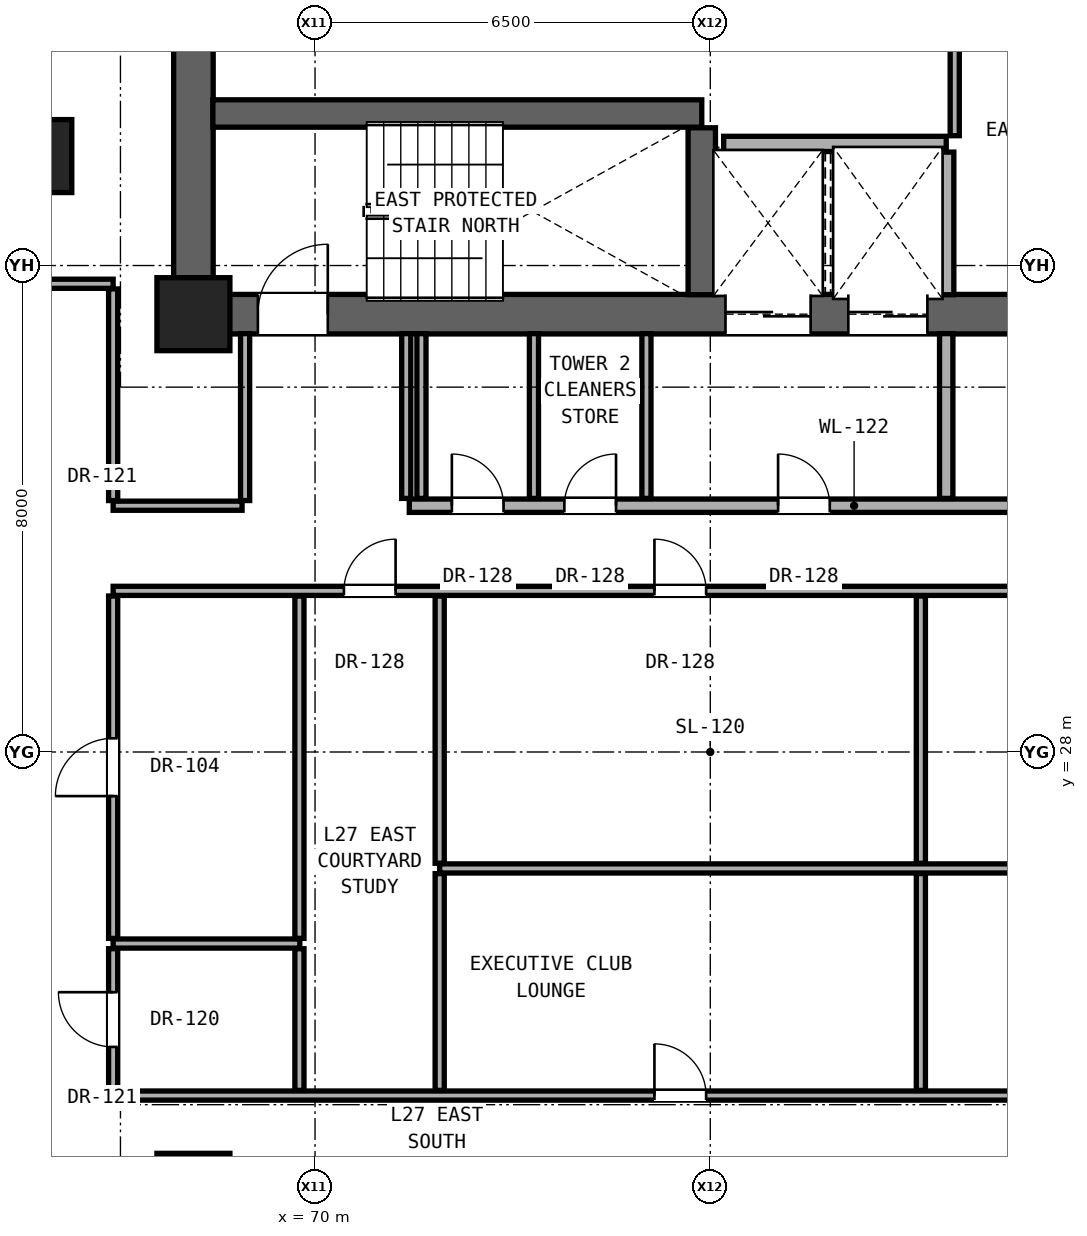
"""IFC4 building model, lengths in metres.
Left out: names, types, materials, properties, quantities, classifications, styles, units other than length and angle.
Written with IfcOpenShell. Run it as: python <this file> out.ifc"""

import sys

from ifc_helpers import new_model, si_unit, direction, frame, frame_2d, origin, origin_2d, place, context, subcontext, project, spatial, rectangle, extrude, element, fill, save


model = new_model("IFC4")
c1 = context("Model", 3, precision=1e-05, world=origin(), true_north=direction((0.0, 1.0)))
c2 = subcontext(c1, "Body", "Model", "MODEL_VIEW")
j1 = project(units=[si_unit("LENGTHUNIT", "METRE"), si_unit("PLANEANGLEUNIT", "RADIAN")], contexts=[c1])
p1 = place(None, origin())
s1 = spatial("IfcSite", under=j1, at=p1, CompositionType="ELEMENT")
p2 = place(p1, origin())
s2 = spatial("IfcBuilding", under=s1, at=p2, CompositionType="ELEMENT")
p3 = place(p2, frame((0.0, 0.0, 98.3)))
s3 = spatial("IfcBuildingStorey", under=s2, at=p3, CompositionType="ELEMENT", Elevation=98.3)
for number, where, z_axis, x_axis in (
    (1, (68.0, 20.8, 0.0), (0.0, 0.0, 1.0), (1.0, 0.0, 0.0)),
    (2, (68.0, 35.2, 0.0), (0.0, 0.0, 1.0), (1.0, 0.0, 0.0)),
):
    element("IfcColumn", number, at=place(p3, frame(where, z_axis=z_axis, x_axis=x_axis)), inside=s3, PredefinedType="COLUMN", context=c2, shape_type="SweptSolid", body=[
        extrude(rectangle(XDim=1.2, YDim=1.2, at=origin_2d()), origin(), (0.0, 0.0, 1.0), 3.3),
    ])
p4 = place(p3, frame((65.6, 37.8, 0.0), z_axis=(0.0, 0.0, 1.0), x_axis=(1.0, 0.0, 0.0)))
e3 = element("IfcColumn", 3, at=p4, inside=s3, PredefinedType="PILASTER", context=c2, shape_type="SweptSolid", body=[
    extrude(rectangle(XDim=0.8, YDim=1.2, at=origin_2d()), origin(), (0.0, 0.0, 1.0), 3.3),
])
p5 = place(p3, frame((68.0, 35.2, 0.0), z_axis=(0.0, 0.0, 1.0), x_axis=(0.0, 1.0, 0.0)))
e4 = element("IfcWall", 4, at=p5, inside=s3, PredefinedType="SHEAR", context=c2, shape_type="SweptSolid", body=[
    extrude(rectangle(XDim=5.6, YDim=0.65, at=frame_2d((2.8, 0.0))), origin(), (0.0, 0.0, 1.0), 3.08),
])
p6 = place(p3, frame((68.0, 35.2, 0.0), z_axis=(0.0, 0.0, 1.0), x_axis=(1.0, 0.0, 0.0)))
e5 = element("IfcWall", 5, at=p6, inside=s3, PredefinedType="SHEAR", context=c2, shape_type="SweptSolid", body=[
    extrude(rectangle(XDim=17.0, YDim=0.65, at=frame_2d((8.5, 0.0))), origin(), (0.0, 0.0, 1.0), 3.08),
])
p7 = place(p6, frame((1.06, 0.0, 0.0)))
e6 = element("IfcOpeningElement", 6, at=p7, cuts=e5, PredefinedType="OPENING", context=c2, shape_type="SweptSolid", body=[
    extrude(rectangle(XDim=1.15, YDim=2.2, at=frame_2d((0.575, 1.1))), frame((0.0, 0.335, 0.0), z_axis=(0.0, -1.0, 0.0), x_axis=(1.0, 0.0, 0.0)), (0.0, 0.0, 1.0), 0.67),
])
p8 = place(p6, frame((8.75, 0.0, 0.0)))
e7 = element("IfcOpeningElement", 7, at=p8, cuts=e5, PredefinedType="OPENING", context=c2, shape_type="SweptSolid", body=[
    extrude(rectangle(XDim=1.4, YDim=2.35, at=frame_2d((0.7, 1.175))), frame((0.0, 0.335, 0.0), z_axis=(0.0, -1.0, 0.0), x_axis=(1.0, 0.0, 0.0)), (0.0, 0.0, 1.0), 0.67),
])
p9 = place(p6, frame((10.77, 0.0, 0.0)))
e8 = element("IfcOpeningElement", 8, at=p9, cuts=e5, PredefinedType="OPENING", context=c2, shape_type="SweptSolid", body=[
    extrude(rectangle(XDim=1.3, YDim=2.3, at=frame_2d((0.65, 1.15))), frame((0.0, 0.335, 0.0), z_axis=(0.0, -1.0, 0.0), x_axis=(1.0, 0.0, 0.0)), (0.0, 0.0, 1.0), 0.67),
])
p10 = place(p3, frame((66.68, 22.35, 0.0), z_axis=(0.0, 0.0, 1.0), x_axis=(1.0, 0.0, 0.0)))
e9 = element("IfcWall", 9, at=p10, inside=s3, PredefinedType="PARTITIONING", context=c2, shape_type="SweptSolid", body=[
    extrude(rectangle(XDim=19.5, YDim=0.15, at=frame_2d((9.75, 0.0))), origin(), (0.0, 0.0, 1.0), 2.145),
])
p11 = place(p10, frame((8.902, 0.0, 0.0)))
e10 = element("IfcOpeningElement", 10, at=p11, cuts=e9, PredefinedType="OPENING", context=c2, shape_type="SweptSolid", body=[
    extrude(rectangle(XDim=0.85, YDim=2.01, at=frame_2d((0.425, 1.005))), frame((0.0, 0.085, 0.0), z_axis=(0.0, -1.0, 0.0), x_axis=(1.0, 0.0, 0.0)), (0.0, 0.0, 1.0), 0.17),
])
p12 = place(p10, frame((15.947, 0.0, 0.0)))
e11 = element("IfcOpeningElement", 11, at=p12, cuts=e9, PredefinedType="OPENING", context=c2, shape_type="SweptSolid", body=[
    extrude(rectangle(XDim=0.85, YDim=2.01, at=frame_2d((0.425, 1.005))), frame((0.0, 0.085, 0.0), z_axis=(0.0, -1.0, 0.0), x_axis=(1.0, 0.0, 0.0)), (0.0, 0.0, 1.0), 0.17),
])
p13 = place(p3, frame((66.68, 24.85, 0.0), z_axis=(0.0, 0.0, 1.0), x_axis=(1.0, 0.0, 0.0)))
e12 = element("IfcWall", 12, at=p13, inside=s3, PredefinedType="PARTITIONING", context=c2, shape_type="SweptSolid", body=[
    extrude(rectangle(XDim=3.07, YDim=0.15, at=frame_2d((1.535, 0.0))), origin(), (0.0, 0.0, 1.0), 2.145),
])
p14 = place(p3, frame((72.05, 26.085, 0.0), z_axis=(0.0, 0.0, 1.0), x_axis=(1.0, 0.0, 0.0)))
e13 = element("IfcWall", 13, at=p14, inside=s3, PredefinedType="PARTITIONING", context=c2, shape_type="SweptSolid", body=[
    extrude(rectangle(XDim=14.13, YDim=0.15, at=frame_2d((7.065, 0.0))), origin(), (0.0, 0.0, 1.0), 2.145),
])
p15 = place(p3, frame((66.68, 30.65, 0.0), z_axis=(0.0, 0.0, 1.0), x_axis=(1.0, 0.0, 0.0)))
e14 = element("IfcWall", 14, at=p15, inside=s3, PredefinedType="PARTITIONING", context=c2, shape_type="SweptSolid", body=[
    extrude(rectangle(XDim=19.5, YDim=0.15, at=frame_2d((9.75, 0.0))), origin(), (0.0, 0.0, 1.0), 2.145),
])
p16 = place(p15, frame((3.795, 0.0, 0.0)))
e15 = element("IfcOpeningElement", 15, at=p16, cuts=e14, PredefinedType="OPENING", context=c2, shape_type="SweptSolid", body=[
    extrude(rectangle(XDim=0.85, YDim=2.01, at=frame_2d((0.425, 1.005))), frame((0.0, 0.085, 0.0), z_axis=(0.0, -1.0, 0.0), x_axis=(1.0, 0.0, 0.0)), (0.0, 0.0, 1.0), 0.17),
])
p17 = place(p15, frame((8.902, 0.0, 0.0)))
e16 = element("IfcOpeningElement", 16, at=p17, cuts=e14, PredefinedType="OPENING", context=c2, shape_type="SweptSolid", body=[
    extrude(rectangle(XDim=0.85, YDim=2.01, at=frame_2d((0.425, 1.005))), frame((0.0, 0.085, 0.0), z_axis=(0.0, -1.0, 0.0), x_axis=(1.0, 0.0, 0.0)), (0.0, 0.0, 1.0), 0.17),
])
p18 = place(p15, frame((15.947, 0.0, 0.0)))
e17 = element("IfcOpeningElement", 17, at=p18, cuts=e14, PredefinedType="OPENING", context=c2, shape_type="SweptSolid", body=[
    extrude(rectangle(XDim=0.85, YDim=2.01, at=frame_2d((0.425, 1.005))), frame((0.0, 0.085, 0.0), z_axis=(0.0, -1.0, 0.0), x_axis=(1.0, 0.0, 0.0)), (0.0, 0.0, 1.0), 0.17),
])
p19 = place(p3, frame((66.68, 32.05, 0.0), z_axis=(0.0, 0.0, 1.0), x_axis=(1.0, 0.0, 0.0)))
e18 = element("IfcWall", 18, at=p19, inside=s3, PredefinedType="PARTITIONING", context=c2, shape_type="SweptSolid", body=[
    extrude(rectangle(XDim=2.12, YDim=0.15, at=frame_2d((1.06, 0.0))), origin(), (0.0, 0.0, 1.0), 2.145),
])
p20 = place(p3, frame((71.55, 32.05, 0.0), z_axis=(0.0, 0.0, 1.0), x_axis=(1.0, 0.0, 0.0)))
e19 = element("IfcWall", 19, at=p20, inside=s3, PredefinedType="SOLIDWALL", context=c2, shape_type="SweptSolid", body=[
    extrude(rectangle(XDim=14.63, YDim=0.22, at=frame_2d((7.315, 0.0))), origin(), (0.0, 0.0, 1.0), 2.145),
])
p21 = place(p20, frame((6.065, 0.0, 0.0)))
e20 = element("IfcOpeningElement", 20, at=p21, cuts=e19, PredefinedType="OPENING", context=c2, shape_type="SweptSolid", body=[
    extrude(rectangle(XDim=0.85, YDim=2.01, at=frame_2d((0.425, 1.005))), frame((0.0, 0.12, 0.0), z_axis=(0.0, -1.0, 0.0), x_axis=(1.0, 0.0, 0.0)), (0.0, 0.0, 1.0), 0.24),
])
p22 = place(p20, frame((10.585, 0.0, 0.0)))
e21 = element("IfcOpeningElement", 21, at=p22, cuts=e19, PredefinedType="OPENING", context=c2, shape_type="SweptSolid", body=[
    extrude(rectangle(XDim=0.85, YDim=2.01, at=frame_2d((0.425, 1.005))), frame((0.0, 0.12, 0.0), z_axis=(0.0, -1.0, 0.0), x_axis=(1.0, 0.0, 0.0)), (0.0, 0.0, 1.0), 0.24),
])
p23 = place(p20, frame((0.7, 0.0, 0.0)))
e22 = element("IfcOpeningElement", 22, at=p23, cuts=e19, PredefinedType="OPENING", context=c2, shape_type="SweptSolid", body=[
    extrude(rectangle(XDim=0.85, YDim=2.01, at=frame_2d((0.425, 1.005))), frame((0.0, 0.12, 0.0), z_axis=(0.0, -1.0, 0.0), x_axis=(1.0, 0.0, 0.0)), (0.0, 0.0, 1.0), 0.24),
])
p24 = place(p20, frame((2.55, 0.0, 0.0)))
e23 = element("IfcOpeningElement", 23, at=p24, cuts=e19, PredefinedType="OPENING", context=c2, shape_type="SweptSolid", body=[
    extrude(rectangle(XDim=0.85, YDim=2.01, at=frame_2d((0.425, 1.005))), frame((0.0, 0.12, 0.0), z_axis=(0.0, -1.0, 0.0), x_axis=(1.0, 0.0, 0.0)), (0.0, 0.0, 1.0), 0.24),
])
p25 = place(p3, frame((65.32, 35.7, 0.0), z_axis=(0.0, 0.0, 1.0), x_axis=(1.0, 0.0, 0.0)))
e24 = element("IfcWall", 24, at=p25, inside=s3, PredefinedType="PARTITIONING", context=c2, shape_type="SweptSolid", body=[
    extrude(rectangle(XDim=1.36, YDim=0.15, at=frame_2d((0.68, 0.0))), origin(), (0.0, 0.0, 1.0), 3.08),
])
p26 = place(p3, frame((76.72, 38.0, 0.0), z_axis=(0.0, 0.0, 1.0), x_axis=(1.0, 0.0, 0.0)))
e25 = element("IfcWall", 25, at=p26, inside=s3, PredefinedType="SOLIDWALL", context=c2, shape_type="SweptSolid", body=[
    extrude(rectangle(XDim=3.66, YDim=0.25, at=frame_2d((1.83, 0.0))), origin(), (0.0, 0.0, 1.0), 3.08),
])
p27 = place(p3, frame((68.32, 38.5, 0.0), z_axis=(0.0, 0.0, 1.0), x_axis=(1.0, 0.0, 0.0)))
e26 = element("IfcWall", 26, at=p27, inside=s3, PredefinedType="SHEAR", context=c2, shape_type="SweptSolid", body=[
    extrude(rectangle(XDim=8.04, YDim=0.45, at=frame_2d((4.02, 0.0))), origin(), (0.0, 0.0, 1.0), 3.08),
])
p28 = place(p3, frame((66.68, 22.435, 0.0), z_axis=(0.0, 0.0, 1.0), x_axis=(0.0, 1.0, 0.0)))
e27 = element("IfcWall", 27, at=p28, inside=s3, PredefinedType="PARTITIONING", context=c2, shape_type="SweptSolid", body=[
    extrude(rectangle(XDim=2.33, YDim=0.15, at=frame_2d((1.165, 0.0))), origin(), (0.0, 0.0, 1.0), 3.08),
])
p29 = place(p28, frame((0.715, 0.0, 0.0)))
e28 = element("IfcOpeningElement", 28, at=p29, cuts=e27, PredefinedType="OPENING", context=c2, shape_type="SweptSolid", body=[
    extrude(rectangle(XDim=0.9, YDim=2.1, at=frame_2d((0.45, 1.05))), frame((0.0, 0.085, 0.0), z_axis=(0.0, -1.0, 0.0), x_axis=(1.0, 0.0, 0.0)), (0.0, 0.0, 1.0), 0.17),
])
p30 = place(p3, frame((66.68, 24.935, 0.0), z_axis=(0.0, 0.0, 1.0), x_axis=(0.0, 1.0, 0.0)))
e29 = element("IfcWall", 29, at=p30, inside=s3, PredefinedType="PARTITIONING", context=c2, shape_type="SweptSolid", body=[
    extrude(rectangle(XDim=5.63, YDim=0.15, at=frame_2d((2.815, 0.0))), origin(), (0.0, 0.0, 1.0), 2.299),
])
p31 = place(p30, frame((2.34, 0.0, 0.0)))
e30 = element("IfcOpeningElement", 30, at=p31, cuts=e29, PredefinedType="OPENING", context=c2, shape_type="SweptSolid", body=[
    extrude(rectangle(XDim=0.95, YDim=2.15, at=frame_2d((0.475, 1.075))), frame((0.0, 0.085, 0.0), z_axis=(0.0, -1.0, 0.0), x_axis=(1.0, 0.0, 0.0)), (0.0, 0.0, 1.0), 0.17),
])
p32 = place(p3, frame((66.68, 32.135, 0.0), z_axis=(0.0, 0.0, 1.0), x_axis=(0.0, 1.0, 0.0)))
e31 = element("IfcWall", 31, at=p32, inside=s3, PredefinedType="PARTITIONING", context=c2, shape_type="SweptSolid", body=[
    extrude(rectangle(XDim=3.48, YDim=0.15, at=frame_2d((1.74, 0.0))), origin(), (0.0, 0.0, 1.0), 2.472),
])
p33 = place(p3, frame((68.85, 32.135, 0.0), z_axis=(0.0, 0.0, 1.0), x_axis=(0.0, 1.0, 0.0)))
e32 = element("IfcWall", 32, at=p33, inside=s3, PredefinedType="PARTITIONING", context=c2, shape_type="SweptSolid", body=[
    extrude(rectangle(XDim=2.745, YDim=0.15, at=frame_2d((1.373, 0.0))), origin(), (0.0, 0.0, 1.0), 3.08),
])
p34 = place(p3, frame((69.743, 22.435, 0.0), z_axis=(0.0, 0.0, 1.0), x_axis=(0.0, 1.0, 0.0)))
e33 = element("IfcWall", 33, at=p34, inside=s3, PredefinedType="PARTITIONING", context=c2, shape_type="SweptSolid", body=[
    extrude(rectangle(XDim=2.33, YDim=0.15, at=frame_2d((1.165, 0.0))), origin(), (0.0, 0.0, 1.0), 3.08),
])
p35 = place(p3, frame((69.743, 24.935, 0.0), z_axis=(0.0, 0.0, 1.0), x_axis=(0.0, 1.0, 0.0)))
e34 = element("IfcWall", 34, at=p35, inside=s3, PredefinedType="PARTITIONING", context=c2, shape_type="SweptSolid", body=[
    extrude(rectangle(XDim=5.63, YDim=0.15, at=frame_2d((2.815, 0.0))), origin(), (0.0, 0.0, 1.0), 2.145),
])
for number, where, z_axis, x_axis in (
    (35, (71.5, 32.17, 0.0), (0.0, 0.0, 1.0), (0.0, 1.0, 0.0)),
    (36, (71.75, 32.17, 0.0), (0.0, 0.0, 1.0), (0.0, 1.0, 0.0)),
):
    element("IfcWall", number, at=place(p3, frame(where, z_axis=z_axis, x_axis=x_axis)), inside=s3, PredefinedType="PARTITIONING", context=c2, shape_type="SweptSolid", body=[
        extrude(rectangle(XDim=2.71, YDim=0.15, at=frame_2d((1.355, 0.0))), origin(), (0.0, 0.0, 1.0), 3.08),
    ])
p36 = place(p3, frame((72.05, 22.435, 0.0), z_axis=(0.0, 0.0, 1.0), x_axis=(0.0, 1.0, 0.0)))
e37 = element("IfcWall", 37, at=p36, inside=s3, PredefinedType="PARTITIONING", context=c2, shape_type="SweptSolid", body=[
    extrude(rectangle(XDim=3.565, YDim=0.15, at=frame_2d((1.782, 0.0))), origin(), (0.0, 0.0, 1.0), 2.609),
])
p37 = place(p3, frame((72.05, 26.17, 0.0), z_axis=(0.0, 0.0, 1.0), x_axis=(0.0, 1.0, 0.0)))
e38 = element("IfcWall", 38, at=p37, inside=s3, PredefinedType="PARTITIONING", context=c2, shape_type="SweptSolid", body=[
    extrude(rectangle(XDim=4.395, YDim=0.15, at=frame_2d((2.198, 0.0))), origin(), (0.0, 0.0, 1.0), 2.145),
])
for number, where, z_axis, x_axis in (
    (39, (73.6, 32.17, 0.0), (0.0, 0.0, 1.0), (0.0, 1.0, 0.0)),
    (40, (75.45, 32.17, 0.0), (0.0, 0.0, 1.0), (0.0, 1.0, 0.0)),
):
    element("IfcWall", number, at=place(p3, frame(where, z_axis=z_axis, x_axis=x_axis)), inside=s3, PredefinedType="PARTITIONING", context=c2, shape_type="SweptSolid", body=[
        extrude(rectangle(XDim=2.71, YDim=0.15, at=frame_2d((1.355, 0.0))), origin(), (0.0, 0.0, 1.0), 3.08),
    ])
p38 = place(p3, frame((76.36, 35.52, 0.0), z_axis=(0.0, 0.0, 1.0), x_axis=(0.0, 1.0, 0.0)))
e41 = element("IfcWall", 41, at=p38, inside=s3, PredefinedType="SHEAR", context=c2, shape_type="SweptSolid", body=[
    extrude(rectangle(XDim=2.745, YDim=0.45, at=frame_2d((1.373, 0.0))), origin(), (0.0, 0.0, 1.0), 3.08),
])
p39 = place(p3, frame((79.963, 22.435, 0.0), z_axis=(0.0, 0.0, 1.0), x_axis=(0.0, 1.0, 0.0)))
e42 = element("IfcWall", 42, at=p39, inside=s3, PredefinedType="PARTITIONING", context=c2, shape_type="SweptSolid", body=[
    extrude(rectangle(XDim=3.565, YDim=0.15, at=frame_2d((1.782, 0.0))), origin(), (0.0, 0.0, 1.0), 3.08),
])
p40 = place(p3, frame((79.963, 26.17, 0.0), z_axis=(0.0, 0.0, 1.0), x_axis=(0.0, 1.0, 0.0)))
e43 = element("IfcWall", 43, at=p40, inside=s3, PredefinedType="PARTITIONING", context=c2, shape_type="SweptSolid", body=[
    extrude(rectangle(XDim=4.395, YDim=0.15, at=frame_2d((2.198, 0.0))), origin(), (0.0, 0.0, 1.0), 2.145),
])
p41 = place(p3, frame((80.38, 32.17, 0.0), z_axis=(0.0, 0.0, 1.0), x_axis=(0.0, 1.0, 0.0)))
e44 = element("IfcWall", 44, at=p41, inside=s3, PredefinedType="SOLIDWALL", context=c2, shape_type="SweptSolid", body=[
    extrude(rectangle(XDim=2.71, YDim=0.22, at=frame_2d((1.355, 0.0))), origin(), (0.0, 0.0, 1.0), 3.08),
])
p42 = place(p3, frame((80.38, 35.52, 0.0), z_axis=(0.0, 0.0, 1.0), x_axis=(0.0, 1.0, 0.0)))
e45 = element("IfcWall", 45, at=p42, inside=s3, PredefinedType="SOLIDWALL", context=c2, shape_type="SweptSolid", body=[
    extrude(rectangle(XDim=2.345, YDim=0.25, at=frame_2d((1.172, 0.0))), origin(), (0.0, 0.0, 1.0), 3.08),
])
p43 = place(p3, frame((80.52, 38.135, 0.0), z_axis=(0.0, 0.0, 1.0), x_axis=(0.0, 1.0, 0.0)))
e46 = element("IfcWall", 46, at=p43, inside=s3, PredefinedType="PARTITIONING", context=c2, shape_type="SweptSolid", body=[
    extrude(rectangle(XDim=2.315, YDim=0.15, at=frame_2d((1.157, 0.0))), origin(), (0.0, 0.0, 1.0), 3.08),
])
p44 = place(p7, origin())
e47 = element("IfcDoor", 47, at=p44, inside=s3, OperationType="SINGLE_SWING_RIGHT", PredefinedType="DOOR", context=c2, shape_type="SweptSolid", body=[
    extrude(rectangle(XDim=1.15, YDim=2.2, at=frame_2d((0.575, 1.1))), frame((0.0, 0.025, 0.0), z_axis=(0.0, -1.0, 0.0), x_axis=(1.0, 0.0, 0.0)), (0.0, 0.0, 1.0), 0.05),
])
fill(e6, e47)
p45 = place(p21, origin())
e48 = element("IfcDoor", 48, at=p45, inside=s3, OperationType="SINGLE_SWING_LEFT", PredefinedType="DOOR", context=c2, shape_type="SweptSolid", body=[
    extrude(rectangle(XDim=0.85, YDim=2.01, at=frame_2d((0.425, 1.005))), frame((0.0, 0.025, 0.0), z_axis=(0.0, -1.0, 0.0), x_axis=(1.0, 0.0, 0.0)), (0.0, 0.0, 1.0), 0.05),
])
fill(e20, e48)
p46 = place(p23, origin())
e49 = element("IfcDoor", 49, at=p46, inside=s3, OperationType="SINGLE_SWING_LEFT", PredefinedType="DOOR", context=c2, shape_type="SweptSolid", body=[
    extrude(rectangle(XDim=0.85, YDim=2.01, at=frame_2d((0.425, 1.005))), frame((0.0, 0.025, 0.0), z_axis=(0.0, -1.0, 0.0), x_axis=(1.0, 0.0, 0.0)), (0.0, 0.0, 1.0), 0.05),
])
fill(e22, e49)
p47 = place(p24, origin())
e50 = element("IfcDoor", 50, at=p47, inside=s3, OperationType="SINGLE_SWING_RIGHT", PredefinedType="DOOR", context=c2, shape_type="SweptSolid", body=[
    extrude(rectangle(XDim=0.85, YDim=2.01, at=frame_2d((0.425, 1.005))), frame((0.0, 0.025, 0.0), z_axis=(0.0, -1.0, 0.0), x_axis=(1.0, 0.0, 0.0)), (0.0, 0.0, 1.0), 0.05),
])
fill(e23, e50)
p48 = place(p29, origin())
e51 = element("IfcDoor", 51, at=p48, inside=s3, OperationType="SINGLE_SWING_RIGHT", PredefinedType="DOOR", context=c2, shape_type="SweptSolid", body=[
    extrude(rectangle(XDim=0.9, YDim=2.1, at=frame_2d((0.45, 1.05))), frame((0.0, 0.025, 0.0), z_axis=(0.0, -1.0, 0.0), x_axis=(1.0, 0.0, 0.0)), (0.0, 0.0, 1.0), 0.05),
])
fill(e28, e51)
p49 = place(p31, origin())
e52 = element("IfcDoor", 52, at=p49, inside=s3, OperationType="SINGLE_SWING_LEFT", PredefinedType="DOOR", context=c2, shape_type="SweptSolid", body=[
    extrude(rectangle(XDim=0.95, YDim=2.15, at=frame_2d((0.475, 1.075))), frame((0.0, 0.025, 0.0), z_axis=(0.0, -1.0, 0.0), x_axis=(1.0, 0.0, 0.0)), (0.0, 0.0, 1.0), 0.05),
])
fill(e30, e52)
p50 = place(p16, origin())
e53 = element("IfcDoor", 53, at=p50, inside=s3, OperationType="SINGLE_SWING_RIGHT", PredefinedType="DOOR", context=c2, shape_type="SweptSolid", body=[
    extrude(rectangle(XDim=0.85, YDim=2.01, at=frame_2d((0.425, 1.005))), frame((0.0, 0.025, 0.0), z_axis=(0.0, -1.0, 0.0), x_axis=(1.0, 0.0, 0.0)), (0.0, 0.0, 1.0), 0.05),
])
fill(e15, e53)
p51 = place(p11, origin())
e54 = element("IfcDoor", 54, at=p51, inside=s3, OperationType="SINGLE_SWING_LEFT", PredefinedType="DOOR", context=c2, shape_type="SweptSolid", body=[
    extrude(rectangle(XDim=0.85, YDim=2.01, at=frame_2d((0.425, 1.005))), frame((0.0, 0.025, 0.0), z_axis=(0.0, -1.0, 0.0), x_axis=(1.0, 0.0, 0.0)), (0.0, 0.0, 1.0), 0.05),
])
fill(e10, e54)
p52 = place(p17, origin())
e55 = element("IfcDoor", 55, at=p52, inside=s3, OperationType="SINGLE_SWING_LEFT", PredefinedType="DOOR", context=c2, shape_type="SweptSolid", body=[
    extrude(rectangle(XDim=0.85, YDim=2.01, at=frame_2d((0.425, 1.005))), frame((0.0, 0.025, 0.0), z_axis=(0.0, -1.0, 0.0), x_axis=(1.0, 0.0, 0.0)), (0.0, 0.0, 1.0), 0.05),
])
fill(e16, e55)
p53 = place(p8, origin())
e56 = element("IfcDoor", 56, at=p53, inside=s3, OperationType="DOUBLE_DOOR_SLIDING", PredefinedType="DOOR", context=c2, shape_type="SweptSolid", body=[
    extrude(rectangle(XDim=1.4, YDim=2.35, at=frame_2d((0.7, 1.175))), frame((0.0, 0.025, 0.0), z_axis=(0.0, -1.0, 0.0), x_axis=(1.0, 0.0, 0.0)), (0.0, 0.0, 1.0), 0.05),
])
fill(e7, e56)
p54 = place(p9, origin())
e57 = element("IfcDoor", 57, at=p54, inside=s3, OperationType="DOUBLE_DOOR_SLIDING", PredefinedType="DOOR", context=c2, shape_type="SweptSolid", body=[
    extrude(rectangle(XDim=1.3, YDim=2.3, at=frame_2d((0.65, 1.15))), frame((0.0, 0.025, 0.0), z_axis=(0.0, -1.0, 0.0), x_axis=(1.0, 0.0, 0.0)), (0.0, 0.0, 1.0), 0.05),
])
fill(e8, e57)
save(model, sys.argv[1])
